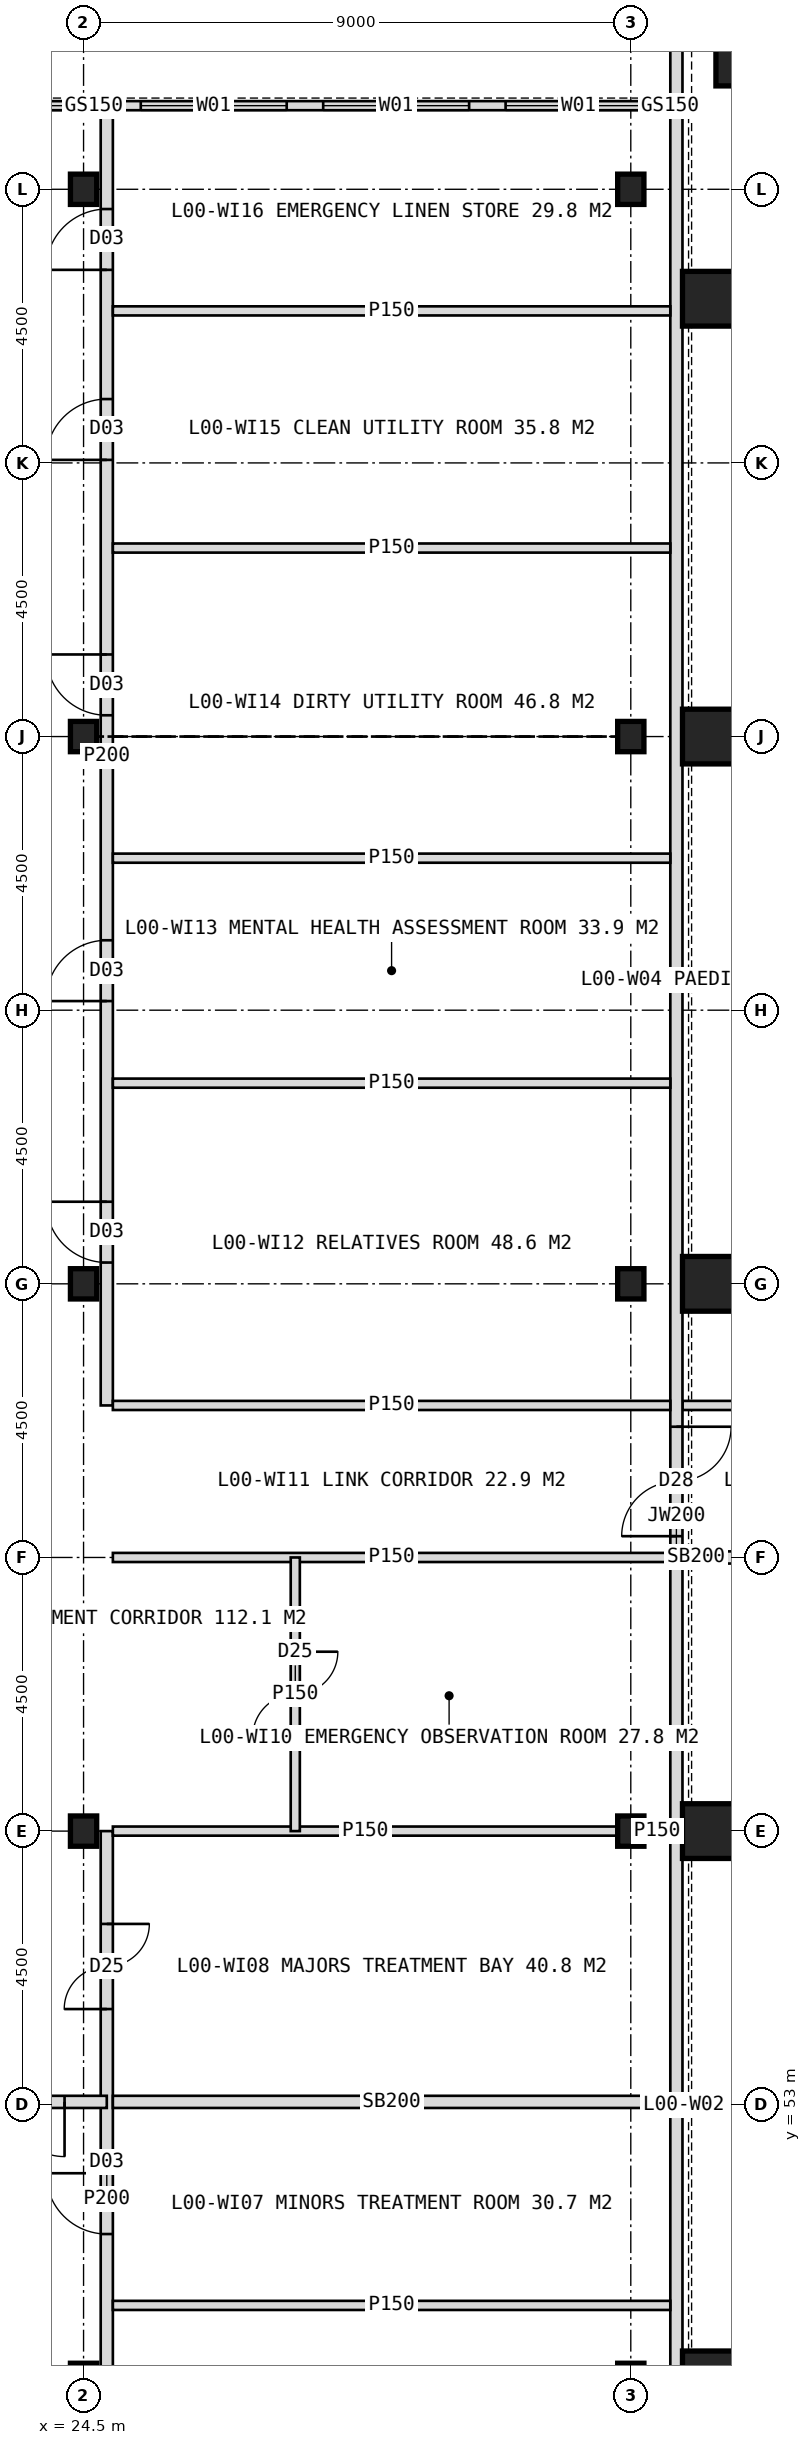
"""IFC4 building model, lengths in metres.
Left out: names, types, materials, properties, quantities, classifications, styles, units other than length and angle.
Written with IfcOpenShell. Run it as: python <this file> out.ifc"""

import sys

from ifc_helpers import new_model, si_unit, direction, frame, frame_2d, origin, origin_2d, place, context, subcontext, project, spatial, rectangle, hollow_rectangle, i_section, extrude, element, fill, save


model = new_model("IFC4")
c1 = context("Model", 3, precision=1e-05, world=origin(), true_north=direction((0.0, 1.0)))
c2 = subcontext(c1, "Body", "Model", "MODEL_VIEW")
j1 = project(units=[si_unit("LENGTHUNIT", "METRE"), si_unit("PLANEANGLEUNIT", "RADIAN")], contexts=[c1])
p1 = place(None, origin())
s1 = spatial("IfcSite", under=j1, at=p1, CompositionType="ELEMENT")
p2 = place(p1, origin())
s2 = spatial("IfcBuilding", under=s1, at=p2, CompositionType="ELEMENT")
p3 = place(p2, origin())
s3 = spatial("IfcBuildingStorey", under=s2, at=p3, CompositionType="ELEMENT", Elevation=0.0)
for number, where, z_axis, x_axis in (
    (1, (34.8, 48.5, 0.0), (0.0, 0.0, 1.0), (1.0, 0.0, 0.0)),
    (2, (34.8, 57.5, 0.0), (0.0, 0.0, 1.0), (1.0, 0.0, 0.0)),
    (3, (34.8, 66.5, 0.0), (0.0, 0.0, 1.0), (1.0, 0.0, 0.0)),
    (4, (34.8, 75.5, 0.0), (0.0, 0.0, 1.0), (1.0, 0.0, 0.0)),
    (5, (34.8, 82.7, 0.0), (0.0, 0.0, 1.0), (1.0, 0.0, 0.0)),
    (6, (35.35, 86.65, 0.0), (0.0, 0.0, 1.0), (1.0, 0.0, 0.0)),
):
    element("IfcColumn", number, at=place(p3, frame(where, z_axis=z_axis, x_axis=x_axis)), inside=s3, PredefinedType="COLUMN", context=c2, shape_type="SweptSolid", body=[
        extrude(hollow_rectangle(XDim=0.9, YDim=0.9, WallThickness=0.08, at=origin_2d()), origin(), (0.0, 0.0, 1.0), 6.0),
    ])
for number, where, z_axis, x_axis in (
    (7, (24.5, 48.5, 0.0), (0.0, 0.0, 1.0), (1.0, 0.0, 0.0)),
    (8, (24.5, 57.5, 0.0), (0.0, 0.0, 1.0), (1.0, 0.0, 0.0)),
    (9, (24.5, 66.5, 0.0), (0.0, 0.0, 1.0), (1.0, 0.0, 0.0)),
    (10, (24.5, 75.5, 0.0), (0.0, 0.0, 1.0), (1.0, 0.0, 0.0)),
    (11, (24.5, 84.5, 0.0), (0.0, 0.0, 1.0), (1.0, 0.0, 0.0)),
    (12, (33.5, 48.5, 0.0), (0.0, 0.0, 1.0), (1.0, 0.0, 0.0)),
    (13, (33.5, 57.5, 0.0), (0.0, 0.0, 1.0), (1.0, 0.0, 0.0)),
    (14, (33.5, 66.5, 0.0), (0.0, 0.0, 1.0), (1.0, 0.0, 0.0)),
    (15, (33.5, 75.5, 0.0), (0.0, 0.0, 1.0), (1.0, 0.0, 0.0)),
    (16, (33.5, 84.5, 0.0), (0.0, 0.0, 1.0), (1.0, 0.0, 0.0)),
):
    element("IfcColumn", number, at=place(p3, frame(where, z_axis=z_axis, x_axis=x_axis)), inside=s3, PredefinedType="COLUMN", context=c2, shape_type="SweptSolid", body=[
        extrude(i_section(OverallWidth=0.432, OverallDepth=0.498, WebThickness=0.056, FlangeThickness=0.089, FilletRadius=0.015, at=origin_2d()), origin(), (0.0, 0.0, 1.0), 6.0),
    ])
p4 = place(p3, frame((34.45, 85.875, 0.0), z_axis=(0.0, 0.0, 1.0), x_axis=(-1.0, 0.0, 0.0)))
e17 = element("IfcWall", 17, at=p4, inside=s3, PredefinedType="STANDARD", context=c2, shape_type="SweptSolid", body=[
    extrude(rectangle(XDim=0.609, YDim=0.15, at=frame_2d((0.304, 0.0))), origin(), (0.0, 0.0, 1.0), 6.0),
])
p5 = place(p3, frame((33.841, 85.875, 0.0), z_axis=(0.0, 0.0, 1.0), x_axis=(-1.0, 0.0, 0.0)))
e18 = element("IfcWall", 18, at=p5, inside=s3, PredefinedType="STANDARD", context=c2, shape_type="SweptSolid", body=[
    extrude(rectangle(XDim=18.341, YDim=0.15, at=frame_2d((9.17, 0.0))), origin(), (0.0, 0.0, 1.0), 5.1),
])
p6 = place(p5, frame((12.891, 0.0, 0.0)))
e19 = element("IfcOpeningElement", 19, at=p6, cuts=e18, PredefinedType="OPENING", context=c2, shape_type="SweptSolid", body=[
    extrude(rectangle(XDim=1.8, YDim=2.4, at=frame_2d((0.9, 1.2))), frame((0.0, 0.085, 0.0), z_axis=(0.0, -1.0, 0.0), x_axis=(1.0, 0.0, 0.0)), (0.0, 0.0, 1.0), 0.17),
])
p7 = place(p5, frame((0.0, 0.0, 0.6)))
e20 = element("IfcOpeningElement", 20, at=p7, cuts=e18, PredefinedType="OPENING", context=c2, shape_type="SweptSolid", body=[
    extrude(rectangle(XDim=2.4, YDim=3.0, at=frame_2d((1.2, 1.5))), frame((0.0, 0.085, 0.0), z_axis=(0.0, -1.0, 0.0), x_axis=(1.0, 0.0, 0.0)), (0.0, 0.0, 1.0), 0.17),
])
p8 = place(p5, frame((3.0, 0.0, 0.6)))
e21 = element("IfcOpeningElement", 21, at=p8, cuts=e18, PredefinedType="OPENING", context=c2, shape_type="SweptSolid", body=[
    extrude(rectangle(XDim=2.4, YDim=3.0, at=frame_2d((1.2, 1.5))), frame((0.0, 0.085, 0.0), z_axis=(0.0, -1.0, 0.0), x_axis=(1.0, 0.0, 0.0)), (0.0, 0.0, 1.0), 0.17),
])
p9 = place(p5, frame((6.0, 0.0, 0.6)))
e22 = element("IfcOpeningElement", 22, at=p9, cuts=e18, PredefinedType="OPENING", context=c2, shape_type="SweptSolid", body=[
    extrude(rectangle(XDim=2.4, YDim=3.0, at=frame_2d((1.2, 1.5))), frame((0.0, 0.085, 0.0), z_axis=(0.0, -1.0, 0.0), x_axis=(1.0, 0.0, 0.0)), (0.0, 0.0, 1.0), 0.17),
])
p10 = place(p5, frame((9.354, 0.0, 0.6)))
e23 = element("IfcOpeningElement", 23, at=p10, cuts=e18, PredefinedType="OPENING", context=c2, shape_type="SweptSolid", body=[
    extrude(rectangle(XDim=2.4, YDim=3.0, at=frame_2d((1.2, 1.5))), frame((0.0, 0.085, 0.0), z_axis=(0.0, -1.0, 0.0), x_axis=(1.0, 0.0, 0.0)), (0.0, 0.0, 1.0), 0.17),
])
p11 = place(p5, frame((15.789, 0.0, 0.6)))
e24 = element("IfcOpeningElement", 24, at=p11, cuts=e18, PredefinedType="OPENING", context=c2, shape_type="SweptSolid", body=[
    extrude(rectangle(XDim=2.4, YDim=3.0, at=frame_2d((1.2, 1.5))), frame((0.0, 0.085, 0.0), z_axis=(0.0, -1.0, 0.0), x_axis=(1.0, 0.0, 0.0)), (0.0, 0.0, 1.0), 0.17),
])
p12 = place(p3, frame((40.5, 62.0, 0.0), z_axis=(0.0, 0.0, 1.0), x_axis=(-1.0, 0.0, 0.0)))
e25 = element("IfcWall", 25, at=p12, inside=s3, PredefinedType="SOLIDWALL", context=c2, shape_type="SweptSolid", body=[
    extrude(rectangle(XDim=5.7, YDim=0.2, at=frame_2d((2.85, 0.0))), origin(), (0.0, 0.0, 1.0), 4.9),
])
p13 = place(p3, frame((34.8, 62.0, 0.0), z_axis=(0.0, 0.0, 1.0), x_axis=(-1.0, 0.0, 0.0)))
e26 = element("IfcWall", 26, at=p13, inside=s3, PredefinedType="SOLIDWALL", context=c2, shape_type="SweptSolid", body=[
    extrude(rectangle(XDim=0.45, YDim=0.2, at=frame_2d((0.225, 0.0))), origin(), (0.0, 0.0, 1.0), 5.7),
])
p14 = place(p3, frame((40.5, 64.5, 0.0), z_axis=(0.0, 0.0, 1.0), x_axis=(-1.0, 0.0, 0.0)))
e27 = element("IfcWall", 27, at=p14, inside=s3, PredefinedType="PARTITIONING", context=c2, shape_type="SweptSolid", body=[
    extrude(rectangle(XDim=6.15, YDim=0.15, at=frame_2d((3.075, 0.0))), origin(), (0.0, 0.0, 1.0), 5.7),
])
p15 = place(p3, frame((24.882, 45.4, 0.0), z_axis=(0.0, 0.0, 1.0), x_axis=(0.0, 1.0, 0.0)))
e28 = element("IfcWall", 28, at=p15, inside=s3, PredefinedType="PARTITIONING", context=c2, shape_type="SweptSolid", body=[
    extrude(rectangle(XDim=12.1, YDim=0.2, at=frame_2d((6.05, 0.0))), origin(), (0.0, 0.0, 1.0), 5.7),
])
p16 = place(p15, frame((1.65, 0.0, 0.0)))
e29 = element("IfcOpeningElement", 29, at=p16, cuts=e28, PredefinedType="OPENING", context=c2, shape_type="SweptSolid", body=[
    extrude(rectangle(XDim=1.0, YDim=2.1, at=frame_2d((0.5, 1.05))), frame((0.0, 0.11, 0.0), z_axis=(0.0, -1.0, 0.0), x_axis=(1.0, 0.0, 0.0)), (0.0, 0.0, 1.0), 0.22),
])
p17 = place(p15, frame((5.473, 0.0, 0.0)))
e30 = element("IfcOpeningElement", 30, at=p17, cuts=e28, PredefinedType="OPENING", context=c2, shape_type="SweptSolid", body=[
    extrude(rectangle(XDim=1.0, YDim=2.1, at=frame_2d((0.5, 1.05))), frame((0.0, 0.11, 0.0), z_axis=(0.0, -1.0, 0.0), x_axis=(1.0, 0.0, 0.0)), (0.0, 0.0, 1.0), 0.22),
])
p18 = place(p15, frame((9.174, 0.0, 0.0)))
e31 = element("IfcOpeningElement", 31, at=p18, cuts=e28, PredefinedType="OPENING", context=c2, shape_type="SweptSolid", body=[
    extrude(rectangle(XDim=1.4, YDim=2.2, at=frame_2d((0.7, 1.1))), frame((0.0, 0.11, 0.0), z_axis=(0.0, -1.0, 0.0), x_axis=(1.0, 0.0, 0.0)), (0.0, 0.0, 1.0), 0.22),
])
p19 = place(p3, frame((24.882, 64.5, 0.0), z_axis=(0.0, 0.0, 1.0), x_axis=(0.0, 1.0, 0.0)))
e32 = element("IfcWall", 32, at=p19, inside=s3, PredefinedType="PARTITIONING", context=c2, shape_type="SweptSolid", body=[
    extrude(rectangle(XDim=21.35, YDim=0.2, at=frame_2d((10.675, 0.0))), origin(), (0.0, 0.0, 1.0), 5.7),
])
p20 = place(p19, frame((2.35, 0.0, 0.0)))
e33 = element("IfcOpeningElement", 33, at=p20, cuts=e32, PredefinedType="OPENING", context=c2, shape_type="SweptSolid", body=[
    extrude(rectangle(XDim=1.0, YDim=2.1, at=frame_2d((0.5, 1.05))), frame((0.0, 0.11, 0.0), z_axis=(0.0, -1.0, 0.0), x_axis=(1.0, 0.0, 0.0)), (0.0, 0.0, 1.0), 0.22),
])
p21 = place(p19, frame((6.65, 0.0, 0.0)))
e34 = element("IfcOpeningElement", 34, at=p21, cuts=e32, PredefinedType="OPENING", context=c2, shape_type="SweptSolid", body=[
    extrude(rectangle(XDim=1.0, YDim=2.1, at=frame_2d((0.5, 1.05))), frame((0.0, 0.11, 0.0), z_axis=(0.0, -1.0, 0.0), x_axis=(1.0, 0.0, 0.0)), (0.0, 0.0, 1.0), 0.22),
])
p22 = place(p19, frame((11.35, 0.0, 0.0)))
e35 = element("IfcOpeningElement", 35, at=p22, cuts=e32, PredefinedType="OPENING", context=c2, shape_type="SweptSolid", body=[
    extrude(rectangle(XDim=1.0, YDim=2.1, at=frame_2d((0.5, 1.05))), frame((0.0, 0.11, 0.0), z_axis=(0.0, -1.0, 0.0), x_axis=(1.0, 0.0, 0.0)), (0.0, 0.0, 1.0), 0.22),
])
p23 = place(p19, frame((15.55, 0.0, 0.0)))
e36 = element("IfcOpeningElement", 36, at=p23, cuts=e32, PredefinedType="OPENING", context=c2, shape_type="SweptSolid", body=[
    extrude(rectangle(XDim=1.0, YDim=2.1, at=frame_2d((0.5, 1.05))), frame((0.0, 0.11, 0.0), z_axis=(0.0, -1.0, 0.0), x_axis=(1.0, 0.0, 0.0)), (0.0, 0.0, 1.0), 0.22),
])
p24 = place(p19, frame((18.675, 0.0, 0.0)))
e37 = element("IfcOpeningElement", 37, at=p24, cuts=e32, PredefinedType="OPENING", context=c2, shape_type="SweptSolid", body=[
    extrude(rectangle(XDim=1.0, YDim=2.1, at=frame_2d((0.5, 1.05))), frame((0.0, 0.11, 0.0), z_axis=(0.0, -1.0, 0.0), x_axis=(1.0, 0.0, 0.0)), (0.0, 0.0, 1.0), 0.22),
])
p25 = place(p3, frame((21.693, 53.047, 0.0), z_axis=(0.0, 0.0, 1.0), x_axis=(1.0, 0.0, 0.0)))
e38 = element("IfcWall", 38, at=p25, inside=s3, PredefinedType="SOLIDWALL", context=c2, shape_type="SweptSolid", body=[
    extrude(rectangle(XDim=3.189, YDim=0.2, at=frame_2d((1.594, 0.0))), origin(), (0.0, 0.0, 1.0), 5.7),
])
p26 = place(p25, frame((0.695, 0.0, 0.0)))
e39 = element("IfcOpeningElement", 39, at=p26, cuts=e38, PredefinedType="OPENING", context=c2, shape_type="SweptSolid", body=[
    extrude(rectangle(XDim=1.8, YDim=2.2, at=frame_2d((0.9, 1.1))), frame((0.0, 0.11, 0.0), z_axis=(0.0, -1.0, 0.0), x_axis=(1.0, 0.0, 0.0)), (0.0, 0.0, 1.0), 0.22),
])
p27 = place(p3, frame((34.25, 36.8, 0.0), z_axis=(0.0, 0.0, 1.0), x_axis=(0.0, 1.0, 0.0)))
e40 = element("IfcWall", 40, at=p27, inside=s3, PredefinedType="SOLIDWALL", context=c2, shape_type="SweptSolid", body=[
    extrude(rectangle(XDim=50.4, YDim=0.2, at=frame_2d((25.2, 0.0))), origin(), (0.0, 0.0, 1.0), 5.7),
])
p28 = place(p27, frame((6.25, 0.0, 0.0)))
e41 = element("IfcOpeningElement", 41, at=p28, cuts=e40, PredefinedType="OPENING", context=c2, shape_type="SweptSolid", body=[
    extrude(rectangle(XDim=1.8, YDim=2.2, at=frame_2d((0.9, 1.1))), frame((0.0, 0.11, 0.0), z_axis=(0.0, -1.0, 0.0), x_axis=(1.0, 0.0, 0.0)), (0.0, 0.0, 1.0), 0.22),
])
p29 = place(p27, frame((25.55, 0.0, 0.0)))
e42 = element("IfcOpeningElement", 42, at=p29, cuts=e40, PredefinedType="OPENING", context=c2, shape_type="SweptSolid", body=[
    extrude(rectangle(XDim=1.8, YDim=2.2, at=frame_2d((0.9, 1.1))), frame((0.0, 0.11, 0.0), z_axis=(0.0, -1.0, 0.0), x_axis=(1.0, 0.0, 0.0)), (0.0, 0.0, 1.0), 0.22),
])
p30 = place(p3, frame((24.982, 49.7, 0.0), z_axis=(0.0, 0.0, 1.0), x_axis=(1.0, 0.0, 0.0)))
e43 = element("IfcWall", 43, at=p30, inside=s3, PredefinedType="PARTITIONING", context=c2, shape_type="SweptSolid", body=[
    extrude(rectangle(XDim=9.168, YDim=0.15, at=frame_2d((4.584, 0.0))), origin(), (0.0, 0.0, 1.0), 5.7),
])
p31 = place(p3, frame((24.982, 53.047, 0.0), z_axis=(0.0, 0.0, 1.0), x_axis=(1.0, 0.0, 0.0)))
e44 = element("IfcWall", 44, at=p31, inside=s3, PredefinedType="SOLIDWALL", context=c2, shape_type="SweptSolid", body=[
    extrude(rectangle(XDim=9.168, YDim=0.2, at=frame_2d((4.584, 0.0))), origin(), (0.0, 0.0, 1.0), 5.7),
])
p32 = place(p3, frame((24.982, 57.5, 0.0), z_axis=(0.0, 0.0, 1.0), x_axis=(1.0, 0.0, 0.0)))
e45 = element("IfcWall", 45, at=p32, inside=s3, PredefinedType="PARTITIONING", context=c2, shape_type="SweptSolid", body=[
    extrude(rectangle(XDim=8.302, YDim=0.15, at=frame_2d((4.151, 0.0))), origin(), (0.0, 0.0, 1.0), 4.9),
])
p33 = place(p3, frame((33.716, 57.5, 0.0), z_axis=(0.0, 0.0, 1.0), x_axis=(1.0, 0.0, 0.0)))
e46 = element("IfcWall", 46, at=p33, inside=s3, PredefinedType="PARTITIONING", context=c2, shape_type="SweptSolid", body=[
    extrude(rectangle(XDim=0.434, YDim=0.15, at=frame_2d((0.217, 0.0))), origin(), (0.0, 0.0, 1.0), 5.7),
])
for number, where, z_axis, x_axis in (
    (47, (24.982, 62.0, 0.0), (0.0, 0.0, 1.0), (1.0, 0.0, 0.0)),
    (48, (24.982, 64.5, 0.0), (0.0, 0.0, 1.0), (1.0, 0.0, 0.0)),
    (49, (24.982, 69.8, 0.0), (0.0, 0.0, 1.0), (1.0, 0.0, 0.0)),
    (50, (24.982, 73.5, 0.0), (0.0, 0.0, 1.0), (1.0, 0.0, 0.0)),
    (51, (24.982, 78.6, 0.0), (0.0, 0.0, 1.0), (1.0, 0.0, 0.0)),
    (52, (24.982, 82.5, 0.0), (0.0, 0.0, 1.0), (1.0, 0.0, 0.0)),
):
    element("IfcWall", number, at=place(p3, frame(where, z_axis=z_axis, x_axis=x_axis)), inside=s3, PredefinedType="PARTITIONING", context=c2, shape_type="SweptSolid", body=[
        extrude(rectangle(XDim=9.168, YDim=0.15, at=frame_2d((4.584, 0.0))), origin(), (0.0, 0.0, 1.0), 5.7),
    ])
p34 = place(p3, frame((27.982, 57.5, 0.0), z_axis=(0.0, 0.0, 1.0), x_axis=(0.0, 1.0, 0.0)))
e53 = element("IfcWall", 53, at=p34, inside=s3, PredefinedType="PARTITIONING", context=c2, shape_type="SweptSolid", body=[
    extrude(rectangle(XDim=4.5, YDim=0.15, at=frame_2d((2.25, 0.0))), origin(), (0.0, 0.0, 1.0), 5.7),
])
p35 = place(p34, frame((1.55, 0.0, 0.0)))
e54 = element("IfcOpeningElement", 54, at=p35, cuts=e53, PredefinedType="OPENING", context=c2, shape_type="SweptSolid", body=[
    extrude(rectangle(XDim=1.4, YDim=2.2, at=frame_2d((0.7, 1.1))), frame((0.0, 0.085, 0.0), z_axis=(0.0, -1.0, 0.0), x_axis=(1.0, 0.0, 0.0)), (0.0, 0.0, 1.0), 0.17),
])
p36 = place(p7, origin())
e55 = element("IfcWindow", 55, at=p36, inside=s3, PartitioningType="SINGLE_PANEL", PredefinedType="WINDOW", context=c2, shape_type="SweptSolid", body=[
    extrude(rectangle(XDim=2.4, YDim=3.0, at=frame_2d((1.2, 1.5))), frame((0.0, 0.03, 0.0), z_axis=(0.0, -1.0, 0.0), x_axis=(1.0, 0.0, 0.0)), (0.0, 0.0, 1.0), 0.06),
])
fill(e20, e55)
p37 = place(p8, origin())
e56 = element("IfcWindow", 56, at=p37, inside=s3, PartitioningType="SINGLE_PANEL", PredefinedType="WINDOW", context=c2, shape_type="SweptSolid", body=[
    extrude(rectangle(XDim=2.4, YDim=3.0, at=frame_2d((1.2, 1.5))), frame((0.0, 0.03, 0.0), z_axis=(0.0, -1.0, 0.0), x_axis=(1.0, 0.0, 0.0)), (0.0, 0.0, 1.0), 0.06),
])
fill(e21, e56)
p38 = place(p9, origin())
e57 = element("IfcWindow", 57, at=p38, inside=s3, PartitioningType="SINGLE_PANEL", PredefinedType="WINDOW", context=c2, shape_type="SweptSolid", body=[
    extrude(rectangle(XDim=2.4, YDim=3.0, at=frame_2d((1.2, 1.5))), frame((0.0, 0.03, 0.0), z_axis=(0.0, -1.0, 0.0), x_axis=(1.0, 0.0, 0.0)), (0.0, 0.0, 1.0), 0.06),
])
fill(e22, e57)
p39 = place(p10, origin())
e58 = element("IfcWindow", 58, at=p39, inside=s3, PartitioningType="SINGLE_PANEL", PredefinedType="WINDOW", context=c2, shape_type="SweptSolid", body=[
    extrude(rectangle(XDim=2.4, YDim=3.0, at=frame_2d((1.2, 1.5))), frame((0.0, 0.03, 0.0), z_axis=(0.0, -1.0, 0.0), x_axis=(1.0, 0.0, 0.0)), (0.0, 0.0, 1.0), 0.06),
])
fill(e23, e58)
p40 = place(p26, origin())
e59 = element("IfcDoor", 59, at=p40, inside=s3, OperationType="DOUBLE_DOOR_DOUBLE_SWING", PredefinedType="DOOR", context=c2, shape_type="SweptSolid", body=[
    extrude(rectangle(XDim=1.8, YDim=2.2, at=frame_2d((0.9, 1.1))), frame((0.0, 0.025, 0.0), z_axis=(0.0, -1.0, 0.0), x_axis=(1.0, 0.0, 0.0)), (0.0, 0.0, 1.0), 0.05),
])
fill(e39, e59)
p41 = place(p29, origin())
e60 = element("IfcDoor", 60, at=p41, inside=s3, OperationType="DOUBLE_DOOR_SINGLE_SWING", PredefinedType="DOOR", context=c2, shape_type="SweptSolid", body=[
    extrude(rectangle(XDim=1.8, YDim=2.2, at=frame_2d((0.9, 1.1))), frame((0.0, 0.025, 0.0), z_axis=(0.0, -1.0, 0.0), x_axis=(1.0, 0.0, 0.0)), (0.0, 0.0, 1.0), 0.05),
])
fill(e42, e60)
p42 = place(p17, origin())
e61 = element("IfcDoor", 61, at=p42, inside=s3, OperationType="SINGLE_SWING_RIGHT", PredefinedType="DOOR", context=c2, shape_type="SweptSolid", body=[
    extrude(rectangle(XDim=1.0, YDim=2.1, at=frame_2d((0.5, 1.05))), frame((0.0, 0.025, 0.0), z_axis=(0.0, -1.0, 0.0), x_axis=(1.0, 0.0, 0.0)), (0.0, 0.0, 1.0), 0.05),
])
fill(e30, e61)
p43 = place(p18, origin())
e62 = element("IfcDoor", 62, at=p43, inside=s3, OperationType="DOUBLE_DOOR_SINGLE_SWING", PredefinedType="DOOR", context=c2, shape_type="SweptSolid", body=[
    extrude(rectangle(XDim=1.4, YDim=2.2, at=frame_2d((0.7, 1.1))), frame((0.0, 0.025, 0.0), z_axis=(0.0, -1.0, 0.0), x_axis=(1.0, 0.0, 0.0)), (0.0, 0.0, 1.0), 0.05),
])
fill(e31, e62)
p44 = place(p35, origin())
e63 = element("IfcDoor", 63, at=p44, inside=s3, OperationType="DOUBLE_DOOR_SINGLE_SWING", PredefinedType="DOOR", context=c2, shape_type="SweptSolid", body=[
    extrude(rectangle(XDim=1.4, YDim=2.2, at=frame_2d((0.7, 1.1))), frame((0.0, 0.025, 0.0), z_axis=(0.0, -1.0, 0.0), x_axis=(1.0, 0.0, 0.0)), (0.0, 0.0, 1.0), 0.05),
])
fill(e54, e63)
p45 = place(p20, origin())
e64 = element("IfcDoor", 64, at=p45, inside=s3, OperationType="SINGLE_SWING_RIGHT", PredefinedType="DOOR", context=c2, shape_type="SweptSolid", body=[
    extrude(rectangle(XDim=1.0, YDim=2.1, at=frame_2d((0.5, 1.05))), frame((0.0, 0.025, 0.0), z_axis=(0.0, -1.0, 0.0), x_axis=(1.0, 0.0, 0.0)), (0.0, 0.0, 1.0), 0.05),
])
fill(e33, e64)
p46 = place(p21, origin())
e65 = element("IfcDoor", 65, at=p46, inside=s3, OperationType="SINGLE_SWING_LEFT", PredefinedType="DOOR", context=c2, shape_type="SweptSolid", body=[
    extrude(rectangle(XDim=1.0, YDim=2.1, at=frame_2d((0.5, 1.05))), frame((0.0, 0.025, 0.0), z_axis=(0.0, -1.0, 0.0), x_axis=(1.0, 0.0, 0.0)), (0.0, 0.0, 1.0), 0.05),
])
fill(e34, e65)
p47 = place(p22, origin())
e66 = element("IfcDoor", 66, at=p47, inside=s3, OperationType="SINGLE_SWING_RIGHT", PredefinedType="DOOR", context=c2, shape_type="SweptSolid", body=[
    extrude(rectangle(XDim=1.0, YDim=2.1, at=frame_2d((0.5, 1.05))), frame((0.0, 0.025, 0.0), z_axis=(0.0, -1.0, 0.0), x_axis=(1.0, 0.0, 0.0)), (0.0, 0.0, 1.0), 0.05),
])
fill(e35, e66)
p48 = place(p23, origin())
e67 = element("IfcDoor", 67, at=p48, inside=s3, OperationType="SINGLE_SWING_LEFT", PredefinedType="DOOR", context=c2, shape_type="SweptSolid", body=[
    extrude(rectangle(XDim=1.0, YDim=2.1, at=frame_2d((0.5, 1.05))), frame((0.0, 0.025, 0.0), z_axis=(0.0, -1.0, 0.0), x_axis=(1.0, 0.0, 0.0)), (0.0, 0.0, 1.0), 0.05),
])
fill(e36, e67)
p49 = place(p24, origin())
e68 = element("IfcDoor", 68, at=p49, inside=s3, OperationType="SINGLE_SWING_LEFT", PredefinedType="DOOR", context=c2, shape_type="SweptSolid", body=[
    extrude(rectangle(XDim=1.0, YDim=2.1, at=frame_2d((0.5, 1.05))), frame((0.0, 0.025, 0.0), z_axis=(0.0, -1.0, 0.0), x_axis=(1.0, 0.0, 0.0)), (0.0, 0.0, 1.0), 0.05),
])
fill(e37, e68)
save(model, sys.argv[1])
